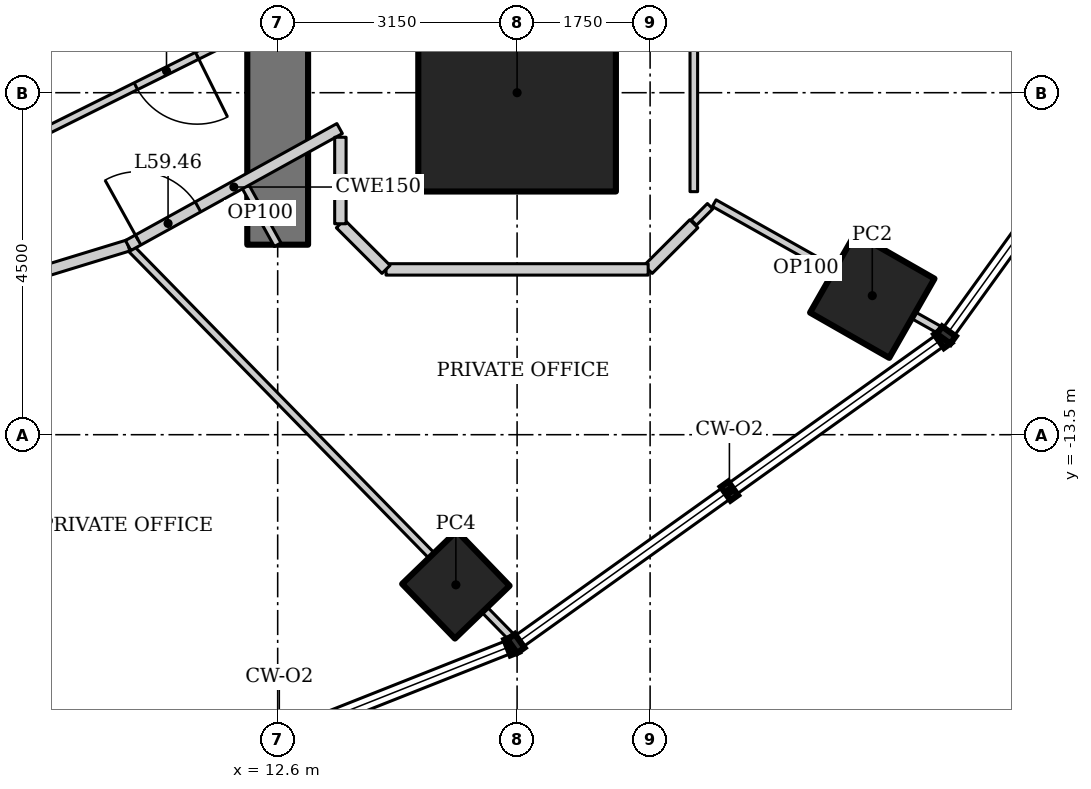
"""IFC4 building model, lengths in metres.
Left out: names, types, materials, properties, quantities, classifications, styles, units other than length and angle.
Written with IfcOpenShell. Run it as: python <this file> out.ifc"""

import sys

from ifc_helpers import new_model, si_unit, direction, frame, frame_2d, origin, origin_2d, place, context, subcontext, project, spatial, rectangle, hollow_rectangle, extrude, element, fill, save


model = new_model("IFC4")
c1 = context("Model", 3, precision=1e-05, world=origin(), true_north=direction((0.0, 1.0)))
c2 = subcontext(c1, "Body", "Model", "MODEL_VIEW")
j1 = project(units=[si_unit("LENGTHUNIT", "METRE"), si_unit("PLANEANGLEUNIT", "RADIAN")], contexts=[c1])
p1 = place(None, origin())
s1 = spatial("IfcSite", under=j1, at=p1, CompositionType="ELEMENT")
p2 = place(p1, origin())
s2 = spatial("IfcBuilding", under=s1, at=p2, CompositionType="ELEMENT")
p3 = place(p2, frame((0.0, 0.0, 253.6)))
s3 = spatial("IfcBuildingStorey", under=s2, at=p3, CompositionType="ELEMENT", Elevation=253.6)
p4 = place(p3, frame((15.75, -9.0, 0.0), z_axis=(0.0, 0.0, 1.0), x_axis=(1.0, 0.0, 0.0)))
e1 = element("IfcColumn", 1, at=p4, inside=s3, PredefinedType="COLUMN", context=c2, shape_type="SweptSolid", body=[
    extrude(hollow_rectangle(XDim=2.6, YDim=2.6, WallThickness=0.13, at=origin_2d()), origin(), (0.0, 0.0, 1.0), 4.2),
])
for number, where, z_axis, x_axis in (
    (2, (9.035, -17.731, 0.0), (0.0, 0.0, 1.0), (0.891, 0.454, 0.0)),
    (3, (14.944, -15.475, 0.0), (0.0, 0.0, 1.0), (0.719, 0.695, 0.0)),
):
    element("IfcColumn", number, at=place(p3, frame(where, z_axis=z_axis, x_axis=x_axis)), inside=s3, PredefinedType="COLUMN", context=c2, shape_type="SweptSolid", body=[
        extrude(hollow_rectangle(XDim=1.0, YDim=1.0, WallThickness=0.08, at=origin_2d()), origin(), (0.0, 0.0, 1.0), 4.2),
    ])
p5 = place(p3, frame((20.423, -11.67, 0.0), z_axis=(0.0, 0.0, 1.0), x_axis=(0.496139221777, 0.86824298017, 0.0)))
e4 = element("IfcColumn", 4, at=p5, inside=s3, PredefinedType="COLUMN", context=c2, shape_type="SweptSolid", body=[
    extrude(hollow_rectangle(XDim=1.2, YDim=1.2, WallThickness=0.1, at=origin_2d()), origin(), (0.0, 0.0, 1.0), 4.2),
])
p6 = place(p3, frame((12.6, -11.0, 0.0), z_axis=(0.0, 0.0, 1.0), x_axis=(0.0, 1.0, 0.0)))
e5 = element("IfcWall", 5, at=p6, inside=s3, PredefinedType="SHEAR", context=c2, shape_type="SweptSolid", body=[
    extrude(rectangle(XDim=22.0, YDim=0.8, at=frame_2d((11.0, 0.0))), origin(), (0.0, 0.0, 1.0), 4.2),
])
p7 = place(p6, frame((10.1, 0.0, 0.0)))
e6 = element("IfcOpeningElement", 6, at=p7, cuts=e5, PredefinedType="OPENING", context=c2, shape_type="SweptSolid", body=[
    extrude(rectangle(XDim=1.8, YDim=2.1, at=frame_2d((0.9, 1.05))), frame((0.0, 0.41, 0.0), z_axis=(0.0, -1.0, 0.0), x_axis=(1.0, 0.0, 0.0)), (0.0, 0.0, 1.0), 0.82),
])
p8 = place(p3, frame((15.709, -16.199, 0.0), z_axis=(0.0, 0.0, 1.0), x_axis=(-0.699362525935, 0.714767135029, 0.0)))
e7 = element("IfcWall", 7, at=p8, inside=s3, PredefinedType="PARTITIONING", context=c2, shape_type="SweptSolid", body=[
    extrude(rectangle(XDim=7.259, YDim=0.1, at=frame_2d((3.629, 0.0))), origin(), (0.0, 0.0, 1.0), 3.41),
])
p9 = place(p3, frame((6.288, -12.341, 0.0), z_axis=(0.0, 0.0, 1.0), x_axis=(0.956185837153, 0.292760388079, 0.0)))
e8 = element("IfcWall", 8, at=p9, inside=s3, PredefinedType="PARTITIONING", context=c2, shape_type="SweptSolid", body=[
    extrude(rectangle(XDim=4.544, YDim=0.15, at=frame_2d((2.272, 0.0))), origin(), (0.0, 0.0, 1.0), 4.05),
])
p10 = place(p9, frame((2.031, 0.0, 0.0)))
e9 = element("IfcOpeningElement", 9, at=p10, cuts=e8, PredefinedType="OPENING", context=c2, shape_type="SweptSolid", body=[
    extrude(rectangle(XDim=0.9, YDim=2.1, at=frame_2d((0.45, 1.05))), frame((0.0, 0.085, 0.0), z_axis=(0.0, -1.0, 0.0), x_axis=(1.0, 0.0, 0.0)), (0.0, 0.0, 1.0), 0.17),
])
p11 = place(p3, frame((12.977, -7.8, 0.0), z_axis=(0.0, 0.0, 1.0), x_axis=(-0.895529831139, -0.445001484874, 0.0)))
e10 = element("IfcWall", 10, at=p11, inside=s3, PredefinedType="PARTITIONING", context=c2, shape_type="SweptSolid", body=[
    extrude(rectangle(XDim=4.108, YDim=0.1, at=frame_2d((2.054, 0.0))), origin(), (0.0, 0.0, 1.0), 4.05),
])
p12 = place(p11, frame((1.604, 0.0, 0.0)))
e11 = element("IfcOpeningElement", 11, at=p12, cuts=e10, PredefinedType="OPENING", context=c2, shape_type="SweptSolid", body=[
    extrude(rectangle(XDim=0.9, YDim=2.1, at=frame_2d((0.45, 1.05))), frame((0.0, 0.06, 0.0), z_axis=(0.0, -1.0, 0.0), x_axis=(1.0, 0.0, 0.0)), (0.0, 0.0, 1.0), 0.12),
])
p13 = place(p3, frame((12.6, -11.0, 0.0), z_axis=(0.0, 0.0, 1.0), x_axis=(-0.484103558985, 0.875010710893, 0.0)))
e12 = element("IfcWall", 12, at=p13, inside=s3, PredefinedType="PARTITIONING", context=c2, shape_type="SweptSolid", body=[
    extrude(rectangle(XDim=0.943, YDim=0.1, at=frame_2d((0.472, 0.0))), origin(), (0.0, 0.0, 1.0), 4.05),
])
p14 = place(p3, frame((21.358, -12.15, 0.0), z_axis=(0.0, 0.0, 1.0), x_axis=(-0.871494482514, 0.49040530885, 0.0)))
e13 = element("IfcWall", 13, at=p14, inside=s3, PredefinedType="PARTITIONING", context=c2, shape_type="SweptSolid", body=[
    extrude(rectangle(XDim=3.459, YDim=0.1, at=frame_2d((1.73, 0.0))), origin(), (0.0, 0.0, 1.0), 3.521),
])
p15 = place(p3, frame((10.633, -11.01, 0.0), z_axis=(0.0, 0.0, 1.0), x_axis=(0.875072100837, 0.483992580869, 0.0)))
e14 = element("IfcWall", 14, at=p15, inside=s3, PredefinedType="PARTITIONING", context=c2, shape_type="SweptSolid", body=[
    extrude(rectangle(XDim=3.179, YDim=0.15, at=frame_2d((1.59, 0.0))), origin(), (0.0, 0.0, 1.0), 4.05),
])
p16 = place(p15, frame((0.15, 0.0, 0.0)))
e15 = element("IfcOpeningElement", 15, at=p16, cuts=e14, PredefinedType="OPENING", context=c2, shape_type="SweptSolid", body=[
    extrude(rectangle(XDim=0.9, YDim=2.1, at=frame_2d((0.45, 1.05))), frame((0.0, 0.085, 0.0), z_axis=(0.0, -1.0, 0.0), x_axis=(1.0, 0.0, 0.0)), (0.0, 0.0, 1.0), 0.17),
])
p17 = place(p3, frame((18.075, -10.725, 0.0), z_axis=(0.0, 0.0, 1.0), x_axis=(-0.707106781187, -0.707106781187, 0.0)))
e16 = element("IfcWall", 16, at=p17, inside=s3, PredefinedType="PARTITIONING", context=c2, shape_type="SweptSolid", body=[
    extrude(rectangle(XDim=0.849, YDim=0.15, at=frame_2d((0.425, 0.0))), origin(), (0.0, 0.0, 1.0), 4.05),
])
p18 = place(p3, frame((17.475, -11.325, 0.0), z_axis=(0.0, 0.0, 1.0), x_axis=(-1.0, 0.0, 0.0)))
e17 = element("IfcWall", 17, at=p18, inside=s3, PredefinedType="PARTITIONING", context=c2, shape_type="SweptSolid", body=[
    extrude(rectangle(XDim=3.449, YDim=0.15, at=frame_2d((1.725, 0.0))), origin(), (0.0, 0.0, 1.0), 4.05),
])
p19 = place(p3, frame((14.025, -11.325, 0.0), z_axis=(0.0, 0.0, 1.0), x_axis=(-0.707106781187, 0.707106781187, 0.0)))
e18 = element("IfcWall", 18, at=p19, inside=s3, PredefinedType="PARTITIONING", context=c2, shape_type="SweptSolid", body=[
    extrude(rectangle(XDim=0.849, YDim=0.15, at=frame_2d((0.425, 0.0))), origin(), (0.0, 0.0, 1.0), 4.05),
])
p20 = place(p3, frame((13.425, -10.725, 0.0), z_axis=(0.0, 0.0, 1.0), x_axis=(0.0, 1.0, 0.0)))
e19 = element("IfcWall", 19, at=p20, inside=s3, PredefinedType="PARTITIONING", context=c2, shape_type="SweptSolid", body=[
    extrude(rectangle(XDim=1.138, YDim=0.15, at=frame_2d((0.569, 0.0))), origin(), (0.0, 0.0, 1.0), 4.05),
])
p21 = place(p3, frame((18.289, -10.493, 0.0), z_axis=(0.0, 0.0, 1.0), x_axis=(-0.707509576179, -0.706703756616, 0.0)))
e20 = element("IfcWall", 20, at=p21, inside=s3, PredefinedType="PARTITIONING", context=c2, shape_type="SweptSolid", body=[
    extrude(rectangle(XDim=0.303, YDim=0.1, at=frame_2d((0.151, 0.0))), origin(), (0.0, 0.0, 1.0), 4.05),
])
p22 = place(p3, frame((18.075, -7.275, 0.0), z_axis=(0.0, 0.0, 1.0), x_axis=(0.0, -1.0, 0.0)))
e21 = element("IfcWall", 21, at=p22, inside=s3, PredefinedType="PARTITIONING", context=c2, shape_type="SweptSolid", body=[
    extrude(rectangle(XDim=3.027, YDim=0.1, at=frame_2d((1.513, 0.0))), origin(), (0.0, 0.0, 1.0), 3.6),
])
p23 = place(p12, origin())
e22 = element("IfcDoor", 22, at=p23, inside=s3, OperationType="SINGLE_SWING_LEFT", PredefinedType="DOOR", context=c2, shape_type="SweptSolid", body=[
    extrude(rectangle(XDim=0.9, YDim=2.1, at=frame_2d((0.45, 1.05))), frame((0.0, 0.025, 0.0), z_axis=(0.0, -1.0, 0.0), x_axis=(1.0, 0.0, 0.0)), (0.0, 0.0, 1.0), 0.05),
])
fill(e11, e22)
p24 = place(p16, origin())
e23 = element("IfcDoor", 23, at=p24, inside=s3, OperationType="SINGLE_SWING_LEFT", PredefinedType="DOOR", context=c2, shape_type="SweptSolid", body=[
    extrude(rectangle(XDim=0.9, YDim=2.1, at=frame_2d((0.45, 1.05))), frame((0.0, 0.025, 0.0), z_axis=(0.0, -1.0, 0.0), x_axis=(1.0, 0.0, 0.0)), (0.0, 0.0, 1.0), 0.05),
])
fill(e15, e23)
save(model, sys.argv[1])
